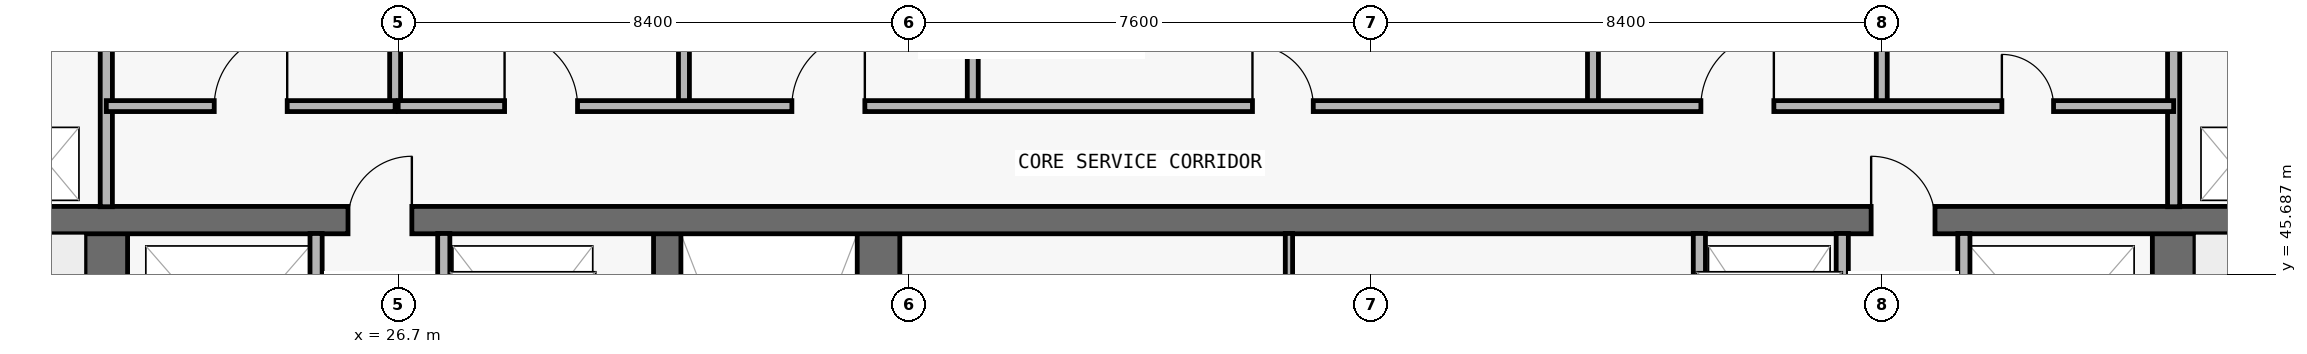
"""IFC4 building model, lengths in metres.
Left out: names, types, materials, properties, quantities, classifications, styles, units other than length and angle.
Written with IfcOpenShell. Run it as: python <this file> out.ifc"""

import sys

from ifc_helpers import new_model, si_unit, direction, frame, frame_2d, origin, place, context, subcontext, project, spatial, rectangle, extrude, element, fill, save


model = new_model("IFC4")
c1 = context("Model", 3, precision=1e-05, world=origin(), true_north=direction((0.0, 1.0)))
c2 = subcontext(c1, "Body", "Model", "MODEL_VIEW")
j1 = project(units=[si_unit("LENGTHUNIT", "METRE"), si_unit("PLANEANGLEUNIT", "RADIAN")], contexts=[c1])
p1 = place(None, origin())
s1 = spatial("IfcSite", under=j1, at=p1, CompositionType="ELEMENT")
p2 = place(p1, origin())
s2 = spatial("IfcBuilding", under=s1, at=p2, CompositionType="ELEMENT")
p3 = place(p2, frame((0.0, 0.0, 269.4)))
s3 = spatial("IfcBuildingStorey", under=s2, at=p3, CompositionType="ELEMENT", Elevation=269.4)
p4 = place(p3, frame((21.9, 37.0, 0.0), z_axis=(0.0, 0.0, 1.0), x_axis=(0.0, 1.0, 0.0)))
e1 = element("IfcWall", 1, at=p4, inside=s3, PredefinedType="SHEAR", context=c2, shape_type="SweptSolid", body=[
    extrude(rectangle(XDim=9.575, YDim=0.7, at=frame_2d((4.788, 0.0))), origin(), (0.0, 0.0, 1.0), 4.5),
])
p5 = place(p4, frame((0.55, 0.0, 0.0)))
e2 = element("IfcOpeningElement", 2, at=p5, cuts=e1, PredefinedType="OPENING", context=c2, shape_type="SweptSolid", body=[
    extrude(rectangle(XDim=1.1, YDim=2.15, at=frame_2d((0.55, 1.075))), frame((0.0, 0.36, 0.0), z_axis=(0.0, -1.0, 0.0), x_axis=(1.0, 0.0, 0.0)), (0.0, 0.0, 1.0), 0.72),
])
p6 = place(p3, frame((55.9, 37.0, 0.0), z_axis=(0.0, 0.0, 1.0), x_axis=(0.0, 1.0, 0.0)))
e3 = element("IfcWall", 3, at=p6, inside=s3, PredefinedType="SHEAR", context=c2, shape_type="SweptSolid", body=[
    extrude(rectangle(XDim=9.575, YDim=0.7, at=frame_2d((4.788, 0.0))), origin(), (0.0, 0.0, 1.0), 4.5),
])
p7 = place(p6, frame((0.55, 0.0, 0.0)))
e4 = element("IfcOpeningElement", 4, at=p7, cuts=e3, PredefinedType="OPENING", context=c2, shape_type="SweptSolid", body=[
    extrude(rectangle(XDim=1.1, YDim=2.15, at=frame_2d((0.55, 1.075))), frame((0.0, 0.36, 0.0), z_axis=(0.0, -1.0, 0.0), x_axis=(1.0, 0.0, 0.0)), (0.0, 0.0, 1.0), 0.72),
])
p8 = place(p3, frame((31.125, 37.0, 0.0), z_axis=(0.0, 0.0, 1.0), x_axis=(0.0, 1.0, 0.0)))
e5 = element("IfcWall", 5, at=p8, inside=s3, PredefinedType="SHEAR", context=c2, shape_type="SweptSolid", body=[
    extrude(rectangle(XDim=9.575, YDim=0.45, at=frame_2d((4.788, 0.0))), origin(), (0.0, 0.0, 1.0), 4.5),
])
p9 = place(p3, frame((34.6, 37.0, 0.0), z_axis=(0.0, 0.0, 1.0), x_axis=(0.0, 1.0, 0.0)))
e6 = element("IfcWall", 6, at=p9, inside=s3, PredefinedType="SHEAR", context=c2, shape_type="SweptSolid", body=[
    extrude(rectangle(XDim=9.575, YDim=0.7, at=frame_2d((4.788, 0.0))), origin(), (0.0, 0.0, 1.0), 4.5),
])
p10 = place(p3, frame((18.3, 46.575, 0.0), z_axis=(0.0, 0.0, 1.0), x_axis=(1.0, 0.0, 0.0)))
e7 = element("IfcWall", 7, at=p10, inside=s3, PredefinedType="SHEAR", context=c2, shape_type="SweptSolid", body=[
    extrude(rectangle(XDim=41.2, YDim=0.45, at=frame_2d((20.6, 0.0))), origin(), (0.0, 0.0, 1.0), 4.5),
])
p11 = place(p10, frame((7.575, 0.0, 0.0)))
e8 = element("IfcOpeningElement", 8, at=p11, cuts=e7, PredefinedType="OPENING", context=c2, shape_type="SweptSolid", body=[
    extrude(rectangle(XDim=1.05, YDim=2.15, at=frame_2d((0.525, 1.075))), frame((0.0, 0.235, 0.0), z_axis=(0.0, -1.0, 0.0), x_axis=(1.0, 0.0, 0.0)), (0.0, 0.0, 1.0), 0.47),
])
p12 = place(p10, frame((32.625, 0.0, 0.0)))
e9 = element("IfcOpeningElement", 9, at=p12, cuts=e7, PredefinedType="OPENING", context=c2, shape_type="SweptSolid", body=[
    extrude(rectangle(XDim=1.05, YDim=2.15, at=frame_2d((0.525, 1.075))), frame((0.0, 0.235, 0.0), z_axis=(0.0, -1.0, 0.0), x_axis=(1.0, 0.0, 0.0)), (0.0, 0.0, 1.0), 0.47),
])
p13 = place(p3, frame((21.9, 46.795, 0.0), z_axis=(0.0, 0.0, 1.0), x_axis=(0.0, 1.0, 0.0)))
e10 = element("IfcWall", 10, at=p13, inside=s3, PredefinedType="PARTITIONING", context=c2, shape_type="SweptSolid", body=[
    extrude(rectangle(XDim=3.16, YDim=0.2, at=frame_2d((1.58, 0.0))), origin(), (0.0, 0.0, 1.0), 4.5),
])
p14 = place(p3, frame((25.35, 43.17, 0.0), z_axis=(0.0, 0.0, 1.0), x_axis=(0.0, 1.0, 0.0)))
e11 = element("IfcWall", 11, at=p14, inside=s3, PredefinedType="PARTITIONING", context=c2, shape_type="SweptSolid", body=[
    extrude(rectangle(XDim=3.185, YDim=0.2, at=frame_2d((1.593, 0.0))), origin(), (0.0, 0.0, 1.0), 4.5),
])
p15 = place(p3, frame((26.65, 48.45, 0.0), z_axis=(0.0, 0.0, 1.0), x_axis=(0.0, 1.0, 0.0)))
e12 = element("IfcWall", 12, at=p15, inside=s3, PredefinedType="PARTITIONING", context=c2, shape_type="SweptSolid", body=[
    extrude(rectangle(XDim=1.505, YDim=0.18, at=frame_2d((0.752, 0.0))), origin(), (0.0, 0.0, 1.0), 4.5),
])
p16 = place(p3, frame((27.45, 43.17, 0.0), z_axis=(0.0, 0.0, 1.0), x_axis=(0.0, 1.0, 0.0)))
e13 = element("IfcWall", 13, at=p16, inside=s3, PredefinedType="PARTITIONING", context=c2, shape_type="SweptSolid", body=[
    extrude(rectangle(XDim=3.185, YDim=0.2, at=frame_2d((1.593, 0.0))), origin(), (0.0, 0.0, 1.0), 4.5),
])
for number, where, z_axis, x_axis in (
    (14, (31.4, 48.45, 0.0), (0.0, 0.0, 1.0), (0.0, 1.0, 0.0)),
    (15, (36.15, 48.45, 0.0), (0.0, 0.0, 1.0), (0.0, 1.0, 0.0)),
):
    element("IfcWall", number, at=place(p3, frame(where, z_axis=z_axis, x_axis=x_axis)), inside=s3, PredefinedType="PARTITIONING", context=c2, shape_type="SweptSolid", body=[
        extrude(rectangle(XDim=1.505, YDim=0.18, at=frame_2d((0.752, 0.0))), origin(), (0.0, 0.0, 1.0), 4.5),
    ])
p17 = place(p3, frame((41.35, 43.17, 0.0), z_axis=(0.0, 0.0, 1.0), x_axis=(0.0, 1.0, 0.0)))
e16 = element("IfcWall", 16, at=p17, inside=s3, PredefinedType="PARTITIONING", context=c2, shape_type="SweptSolid", body=[
    extrude(rectangle(XDim=3.185, YDim=0.12, at=frame_2d((1.593, 0.0))), origin(), (0.0, 0.0, 1.0), 4.5),
])
p18 = place(p3, frame((46.35, 48.45, 0.0), z_axis=(0.0, 0.0, 1.0), x_axis=(0.0, 1.0, 0.0)))
e17 = element("IfcWall", 17, at=p18, inside=s3, PredefinedType="PARTITIONING", context=c2, shape_type="SweptSolid", body=[
    extrude(rectangle(XDim=1.505, YDim=0.18, at=frame_2d((0.752, 0.0))), origin(), (0.0, 0.0, 1.0), 4.5),
])
for number, where, z_axis, x_axis in (
    (18, (48.1, 43.17, 0.0), (0.0, 0.0, 1.0), (0.0, 1.0, 0.0)),
    (19, (50.45, 43.17, 0.0), (0.0, 0.0, 1.0), (0.0, 1.0, 0.0)),
):
    element("IfcWall", number, at=place(p3, frame(where, z_axis=z_axis, x_axis=x_axis)), inside=s3, PredefinedType="PARTITIONING", context=c2, shape_type="SweptSolid", body=[
        extrude(rectangle(XDim=3.185, YDim=0.2, at=frame_2d((1.593, 0.0))), origin(), (0.0, 0.0, 1.0), 4.5),
    ])
p19 = place(p3, frame((51.1, 48.45, 0.0), z_axis=(0.0, 0.0, 1.0), x_axis=(0.0, 1.0, 0.0)))
e20 = element("IfcWall", 20, at=p19, inside=s3, PredefinedType="PARTITIONING", context=c2, shape_type="SweptSolid", body=[
    extrude(rectangle(XDim=1.505, YDim=0.18, at=frame_2d((0.752, 0.0))), origin(), (0.0, 0.0, 1.0), 4.5),
])
p20 = place(p3, frame((52.45, 43.17, 0.0), z_axis=(0.0, 0.0, 1.0), x_axis=(0.0, 1.0, 0.0)))
e21 = element("IfcWall", 21, at=p20, inside=s3, PredefinedType="PARTITIONING", context=c2, shape_type="SweptSolid", body=[
    extrude(rectangle(XDim=3.185, YDim=0.2, at=frame_2d((1.593, 0.0))), origin(), (0.0, 0.0, 1.0), 4.5),
])
p21 = place(p3, frame((55.9, 46.795, 0.0), z_axis=(0.0, 0.0, 1.0), x_axis=(0.0, 1.0, 0.0)))
e22 = element("IfcWall", 22, at=p21, inside=s3, PredefinedType="PARTITIONING", context=c2, shape_type="SweptSolid", body=[
    extrude(rectangle(XDim=3.16, YDim=0.2, at=frame_2d((1.58, 0.0))), origin(), (0.0, 0.0, 1.0), 4.5),
])
p22 = place(p3, frame((21.9, 48.45, 0.0), z_axis=(0.0, 0.0, 1.0), x_axis=(1.0, 0.0, 0.0)))
e23 = element("IfcWall", 23, at=p22, inside=s3, PredefinedType="PARTITIONING", context=c2, shape_type="SweptSolid", body=[
    extrude(rectangle(XDim=4.75, YDim=0.18, at=frame_2d((2.375, 0.0))), origin(), (0.0, 0.0, 1.0), 4.5),
])
p23 = place(p22, frame((1.775, 0.0, 0.0)))
e24 = element("IfcOpeningElement", 24, at=p23, cuts=e23, PredefinedType="OPENING", context=c2, shape_type="SweptSolid", body=[
    extrude(rectangle(XDim=1.2, YDim=2.2, at=frame_2d((0.6, 1.1))), frame((0.0, 0.1, 0.0), z_axis=(0.0, -1.0, 0.0), x_axis=(1.0, 0.0, 0.0)), (0.0, 0.0, 1.0), 0.2),
])
p24 = place(p3, frame((26.7, 48.45, 0.0), z_axis=(0.0, 0.0, 1.0), x_axis=(1.0, 0.0, 0.0)))
e25 = element("IfcWall", 25, at=p24, inside=s3, PredefinedType="PARTITIONING", context=c2, shape_type="SweptSolid", body=[
    extrude(rectangle(XDim=29.2, YDim=0.18, at=frame_2d((14.6, 0.0))), origin(), (0.0, 0.0, 1.0), 4.5),
])
p25 = place(p24, frame((1.75, 0.0, 0.0)))
e26 = element("IfcOpeningElement", 26, at=p25, cuts=e25, PredefinedType="OPENING", context=c2, shape_type="SweptSolid", body=[
    extrude(rectangle(XDim=1.2, YDim=2.2, at=frame_2d((0.6, 1.1))), frame((0.0, 0.1, 0.0), z_axis=(0.0, -1.0, 0.0), x_axis=(1.0, 0.0, 0.0)), (0.0, 0.0, 1.0), 0.2),
])
p26 = place(p24, frame((6.475, 0.0, 0.0)))
e27 = element("IfcOpeningElement", 27, at=p26, cuts=e25, PredefinedType="OPENING", context=c2, shape_type="SweptSolid", body=[
    extrude(rectangle(XDim=1.2, YDim=2.2, at=frame_2d((0.6, 1.1))), frame((0.0, 0.1, 0.0), z_axis=(0.0, -1.0, 0.0), x_axis=(1.0, 0.0, 0.0)), (0.0, 0.0, 1.0), 0.2),
])
p27 = place(p24, frame((14.05, 0.0, 0.0)))
e28 = element("IfcOpeningElement", 28, at=p27, cuts=e25, PredefinedType="OPENING", context=c2, shape_type="SweptSolid", body=[
    extrude(rectangle(XDim=1.0, YDim=2.2, at=frame_2d((0.5, 1.1))), frame((0.0, 0.1, 0.0), z_axis=(0.0, -1.0, 0.0), x_axis=(1.0, 0.0, 0.0)), (0.0, 0.0, 1.0), 0.2),
])
p28 = place(p24, frame((21.425, 0.0, 0.0)))
e29 = element("IfcOpeningElement", 29, at=p28, cuts=e25, PredefinedType="OPENING", context=c2, shape_type="SweptSolid", body=[
    extrude(rectangle(XDim=1.2, YDim=2.2, at=frame_2d((0.6, 1.1))), frame((0.0, 0.1, 0.0), z_axis=(0.0, -1.0, 0.0), x_axis=(1.0, 0.0, 0.0)), (0.0, 0.0, 1.0), 0.2),
])
p29 = place(p24, frame((26.375, 0.0, 0.0)))
e30 = element("IfcOpeningElement", 30, at=p29, cuts=e25, PredefinedType="OPENING", context=c2, shape_type="SweptSolid", body=[
    extrude(rectangle(XDim=0.85, YDim=2.1, at=frame_2d((0.425, 1.05))), frame((0.0, 0.1, 0.0), z_axis=(0.0, -1.0, 0.0), x_axis=(1.0, 0.0, 0.0)), (0.0, 0.0, 1.0), 0.2),
])
p30 = place(p11, origin())
e31 = element("IfcDoor", 31, at=p30, inside=s3, OperationType="SINGLE_SWING_RIGHT", PredefinedType="DOOR", context=c2, shape_type="SweptSolid", body=[
    extrude(rectangle(XDim=1.05, YDim=2.15, at=frame_2d((0.525, 1.075))), frame((0.0, 0.025, 0.0), z_axis=(0.0, -1.0, 0.0), x_axis=(1.0, 0.0, 0.0)), (0.0, 0.0, 1.0), 0.05),
])
fill(e8, e31)
p31 = place(p12, origin())
e32 = element("IfcDoor", 32, at=p31, inside=s3, OperationType="SINGLE_SWING_LEFT", PredefinedType="DOOR", context=c2, shape_type="SweptSolid", body=[
    extrude(rectangle(XDim=1.05, YDim=2.15, at=frame_2d((0.525, 1.075))), frame((0.0, 0.025, 0.0), z_axis=(0.0, -1.0, 0.0), x_axis=(1.0, 0.0, 0.0)), (0.0, 0.0, 1.0), 0.05),
])
fill(e9, e32)
p32 = place(p23, origin())
e33 = element("IfcDoor", 33, at=p32, inside=s3, OperationType="SINGLE_SWING_RIGHT", PredefinedType="DOOR", context=c2, shape_type="SweptSolid", body=[
    extrude(rectangle(XDim=1.2, YDim=2.2, at=frame_2d((0.6, 1.1))), frame((0.0, 0.025, 0.0), z_axis=(0.0, -1.0, 0.0), x_axis=(1.0, 0.0, 0.0)), (0.0, 0.0, 1.0), 0.05),
])
fill(e24, e33)
p33 = place(p25, origin())
e34 = element("IfcDoor", 34, at=p33, inside=s3, OperationType="SINGLE_SWING_LEFT", PredefinedType="DOOR", context=c2, shape_type="SweptSolid", body=[
    extrude(rectangle(XDim=1.2, YDim=2.2, at=frame_2d((0.6, 1.1))), frame((0.0, 0.025, 0.0), z_axis=(0.0, -1.0, 0.0), x_axis=(1.0, 0.0, 0.0)), (0.0, 0.0, 1.0), 0.05),
])
fill(e26, e34)
p34 = place(p26, origin())
e35 = element("IfcDoor", 35, at=p34, inside=s3, OperationType="SINGLE_SWING_RIGHT", PredefinedType="DOOR", context=c2, shape_type="SweptSolid", body=[
    extrude(rectangle(XDim=1.2, YDim=2.2, at=frame_2d((0.6, 1.1))), frame((0.0, 0.025, 0.0), z_axis=(0.0, -1.0, 0.0), x_axis=(1.0, 0.0, 0.0)), (0.0, 0.0, 1.0), 0.05),
])
fill(e27, e35)
p35 = place(p27, origin())
e36 = element("IfcDoor", 36, at=p35, inside=s3, OperationType="SINGLE_SWING_LEFT", PredefinedType="DOOR", context=c2, shape_type="SweptSolid", body=[
    extrude(rectangle(XDim=1.0, YDim=2.2, at=frame_2d((0.5, 1.1))), frame((0.0, 0.025, 0.0), z_axis=(0.0, -1.0, 0.0), x_axis=(1.0, 0.0, 0.0)), (0.0, 0.0, 1.0), 0.05),
])
fill(e28, e36)
p36 = place(p28, origin())
e37 = element("IfcDoor", 37, at=p36, inside=s3, OperationType="SINGLE_SWING_RIGHT", PredefinedType="DOOR", context=c2, shape_type="SweptSolid", body=[
    extrude(rectangle(XDim=1.2, YDim=2.2, at=frame_2d((0.6, 1.1))), frame((0.0, 0.025, 0.0), z_axis=(0.0, -1.0, 0.0), x_axis=(1.0, 0.0, 0.0)), (0.0, 0.0, 1.0), 0.05),
])
fill(e29, e37)
p37 = place(p29, origin())
e38 = element("IfcDoor", 38, at=p37, inside=s3, OperationType="SINGLE_SWING_LEFT", PredefinedType="DOOR", context=c2, shape_type="SweptSolid", body=[
    extrude(rectangle(XDim=0.85, YDim=2.1, at=frame_2d((0.425, 1.05))), frame((0.0, 0.025, 0.0), z_axis=(0.0, -1.0, 0.0), x_axis=(1.0, 0.0, 0.0)), (0.0, 0.0, 1.0), 0.05),
])
fill(e30, e38)
save(model, sys.argv[1])
